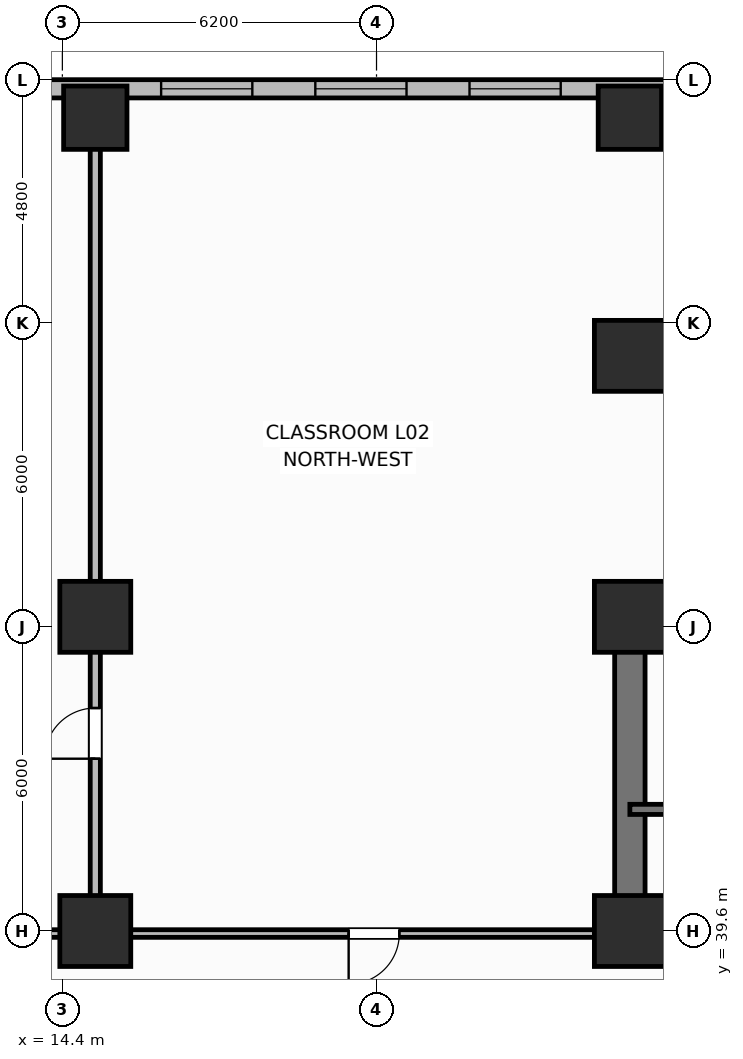
"""IFC4 building model, lengths in metres.
Left out: names, types, materials, properties, quantities, classifications, styles, units other than length and angle.
Written with IfcOpenShell. Run it as: python <this file> out.ifc"""

import sys

from ifc_helpers import new_model, si_unit, direction, frame, frame_2d, origin, origin_2d, place, context, subcontext, project, spatial, rectangle, extrude, element, fill, save


model = new_model("IFC4")
c1 = context("Model", 3, precision=1e-05, world=origin(), true_north=direction((0.0, 1.0)))
c2 = subcontext(c1, "Body", "Model", "MODEL_VIEW")
j1 = project(units=[si_unit("LENGTHUNIT", "METRE"), si_unit("PLANEANGLEUNIT", "RADIAN")], contexts=[c1])
p1 = place(None, origin())
s1 = spatial("IfcSite", under=j1, at=p1, CompositionType="ELEMENT")
p2 = place(p1, origin())
s2 = spatial("IfcBuilding", under=s1, at=p2, CompositionType="ELEMENT")
p3 = place(p2, frame((0.0, 0.0, 11.1)))
s3 = spatial("IfcBuildingStorey", under=s2, at=p3, CompositionType="ELEMENT", Elevation=11.1)
p4 = place(p3, frame((25.6, 45.8, 0.0), z_axis=(0.0, 0.0, 1.0), x_axis=(1.0, 0.0, 0.0)))
e1 = element("IfcWall", 1, at=p4, inside=s3, PredefinedType="SHEAR", context=c2, shape_type="SweptSolid", body=[
    extrude(rectangle(XDim=27.2, YDim=0.6, at=frame_2d((13.6, 0.0))), origin(), (0.0, 0.0, 1.0), 4.5),
])
p5 = place(p3, frame((25.6, 39.9, 0.0), z_axis=(0.0, 0.0, 1.0), x_axis=(0.0, 1.0, 0.0)))
e2 = element("IfcWall", 2, at=p5, inside=s3, PredefinedType="SHEAR", context=c2, shape_type="SweptSolid", body=[
    extrude(rectangle(XDim=5.6, YDim=0.6, at=frame_2d((2.8, 0.0))), origin(), (0.0, 0.0, 1.0), 4.5),
])
p6 = place(p3, frame((52.8, 39.6, 0.0), z_axis=(0.0, 0.0, 1.0), x_axis=(-1.0, 0.0, 0.0)))
e3 = element("IfcWall", 3, at=p6, inside=s3, PredefinedType="SHEAR", context=c2, shape_type="SweptSolid", body=[
    extrude(rectangle(XDim=27.2, YDim=0.6, at=frame_2d((13.6, 0.0))), origin(), (0.0, 0.0, 1.0), 4.5),
])
p7 = place(p6, frame((24.2, 0.0, 0.0)))
e4 = element("IfcOpeningElement", 4, at=p7, cuts=e3, PredefinedType="OPENING", context=c2, shape_type="SweptSolid", body=[
    extrude(rectangle(XDim=1.1, YDim=2.15, at=frame_2d((0.55, 1.075))), frame((0.0, 0.31, 0.0), z_axis=(0.0, -1.0, 0.0), x_axis=(1.0, 0.0, 0.0)), (0.0, 0.0, 1.0), 0.62),
])
p8 = place(p6, frame((15.1, 0.0, 0.0)))
e5 = element("IfcOpeningElement", 5, at=p8, cuts=e3, PredefinedType="OPENING", context=c2, shape_type="SweptSolid", body=[
    extrude(rectangle(XDim=1.2, YDim=2.15, at=frame_2d((0.6, 1.075))), frame((0.0, 0.31, 0.0), z_axis=(0.0, -1.0, 0.0), x_axis=(1.0, 0.0, 0.0)), (0.0, 0.0, 1.0), 0.62),
])
p9 = place(p6, frame((11.6, 0.0, 0.0)))
e6 = element("IfcOpeningElement", 6, at=p9, cuts=e3, PredefinedType="OPENING", context=c2, shape_type="SweptSolid", body=[
    extrude(rectangle(XDim=0.9, YDim=2.1, at=frame_2d((0.45, 1.05))), frame((0.0, 0.31, 0.0), z_axis=(0.0, -1.0, 0.0), x_axis=(1.0, 0.0, 0.0)), (0.0, 0.0, 1.0), 0.62),
])
p10 = place(p6, frame((3.6, 0.0, 0.0)))
e7 = element("IfcOpeningElement", 7, at=p10, cuts=e3, PredefinedType="OPENING", context=c2, shape_type="SweptSolid", body=[
    extrude(rectangle(XDim=1.0, YDim=2.15, at=frame_2d((0.5, 1.075))), frame((0.0, 0.31, 0.0), z_axis=(0.0, -1.0, 0.0), x_axis=(1.0, 0.0, 0.0)), (0.0, 0.0, 1.0), 0.62),
])
for number, where, z_axis, x_axis in (
    (8, (25.6, 39.6, 0.0), (0.0, 0.0, 1.0), (1.0, 0.0, 0.0)),
    (9, (25.6, 45.8, 0.0), (0.0, 0.0, 1.0), (1.0, 0.0, 0.0)),
):
    element("IfcColumn", number, at=place(p3, frame(where, z_axis=z_axis, x_axis=x_axis)), inside=s3, PredefinedType="COLUMN", context=c2, shape_type="SweptSolid", body=[
        extrude(rectangle(XDim=1.4, YDim=1.4, at=origin_2d()), origin(), (0.0, 0.0, 1.0), 4.5),
    ])
for number, where, z_axis, x_axis in (
    (10, (15.05, 55.65, 0.0), (0.0, 0.0, 1.0), (1.0, 0.0, 0.0)),
    (11, (25.6, 55.65, 0.0), (0.0, 0.0, 1.0), (1.0, 0.0, 0.0)),
):
    element("IfcColumn", number, at=place(p3, frame(where, z_axis=z_axis, x_axis=x_axis)), inside=s3, PredefinedType="COLUMN", context=c2, shape_type="SweptSolid", body=[
        extrude(rectangle(XDim=1.25, YDim=1.25, at=origin_2d()), origin(), (0.0, 0.0, 1.0), 4.5),
    ])
for number, where, z_axis, x_axis in (
    (12, (25.6, 50.95, 0.0), (0.0, 0.0, 1.0), (1.0, 0.0, 0.0)),
    (13, (15.05, 39.6, 0.0), (0.0, 0.0, 1.0), (1.0, 0.0, 0.0)),
    (14, (15.05, 45.8, 0.0), (0.0, 0.0, 1.0), (1.0, 0.0, 0.0)),
):
    element("IfcColumn", number, at=place(p3, frame(where, z_axis=z_axis, x_axis=x_axis)), inside=s3, PredefinedType="COLUMN", context=c2, shape_type="SweptSolid", body=[
        extrude(rectangle(XDim=1.4, YDim=1.4, at=origin_2d()), origin(), (0.0, 0.0, 1.0), 4.5),
    ])
p11 = place(p3, frame((56.57, 56.22, 0.0), z_axis=(0.0, 0.0, 1.0), x_axis=(-1.0, 0.0, 0.0)))
e15 = element("IfcWall", 15, at=p11, inside=s3, PredefinedType="SOLIDWALL", context=c2, shape_type="SweptSolid", body=[
    extrude(rectangle(XDim=55.59, YDim=0.36, at=frame_2d((27.795, 0.0))), origin(), (0.0, 0.0, 1.0), 3.48),
])
p12 = place(p11, frame((0.747, 0.0, 0.9)))
e16 = element("IfcOpeningElement", 16, at=p12, cuts=e15, PredefinedType="OPENING", context=c2, shape_type="SweptSolid", body=[
    extrude(rectangle(XDim=1.8, YDim=2.1, at=frame_2d((0.9, 1.05))), frame((0.0, 0.19, 0.0), z_axis=(0.0, -1.0, 0.0), x_axis=(1.0, 0.0, 0.0)), (0.0, 0.0, 1.0), 0.38),
])
p13 = place(p11, frame((5.19, 0.0, 0.9)))
e17 = element("IfcOpeningElement", 17, at=p13, cuts=e15, PredefinedType="OPENING", context=c2, shape_type="SweptSolid", body=[
    extrude(rectangle(XDim=1.8, YDim=2.1, at=frame_2d((0.9, 1.05))), frame((0.0, 0.19, 0.0), z_axis=(0.0, -1.0, 0.0), x_axis=(1.0, 0.0, 0.0)), (0.0, 0.0, 1.0), 0.38),
])
p14 = place(p11, frame((8.233, 0.0, 0.9)))
e18 = element("IfcOpeningElement", 18, at=p14, cuts=e15, PredefinedType="OPENING", context=c2, shape_type="SweptSolid", body=[
    extrude(rectangle(XDim=1.8, YDim=2.1, at=frame_2d((0.9, 1.05))), frame((0.0, 0.19, 0.0), z_axis=(0.0, -1.0, 0.0), x_axis=(1.0, 0.0, 0.0)), (0.0, 0.0, 1.0), 0.38),
])
p15 = place(p11, frame((11.626, 0.0, 0.9)))
e19 = element("IfcOpeningElement", 19, at=p15, cuts=e15, PredefinedType="OPENING", context=c2, shape_type="SweptSolid", body=[
    extrude(rectangle(XDim=1.8, YDim=2.1, at=frame_2d((0.9, 1.05))), frame((0.0, 0.19, 0.0), z_axis=(0.0, -1.0, 0.0), x_axis=(1.0, 0.0, 0.0)), (0.0, 0.0, 1.0), 0.38),
])
p16 = place(p11, frame((14.319, 0.0, 0.9)))
e20 = element("IfcOpeningElement", 20, at=p16, cuts=e15, PredefinedType="OPENING", context=c2, shape_type="SweptSolid", body=[
    extrude(rectangle(XDim=1.8, YDim=2.1, at=frame_2d((0.9, 1.05))), frame((0.0, 0.19, 0.0), z_axis=(0.0, -1.0, 0.0), x_axis=(1.0, 0.0, 0.0)), (0.0, 0.0, 1.0), 0.38),
])
p17 = place(p11, frame((18.762, 0.0, 0.9)))
e21 = element("IfcOpeningElement", 21, at=p17, cuts=e15, PredefinedType="OPENING", context=c2, shape_type="SweptSolid", body=[
    extrude(rectangle(XDim=1.8, YDim=2.1, at=frame_2d((0.9, 1.05))), frame((0.0, 0.19, 0.0), z_axis=(0.0, -1.0, 0.0), x_axis=(1.0, 0.0, 0.0)), (0.0, 0.0, 1.0), 0.38),
])
p18 = place(p11, frame((21.805, 0.0, 0.9)))
e22 = element("IfcOpeningElement", 22, at=p18, cuts=e15, PredefinedType="OPENING", context=c2, shape_type="SweptSolid", body=[
    extrude(rectangle(XDim=1.8, YDim=2.1, at=frame_2d((0.9, 1.05))), frame((0.0, 0.19, 0.0), z_axis=(0.0, -1.0, 0.0), x_axis=(1.0, 0.0, 0.0)), (0.0, 0.0, 1.0), 0.38),
])
p19 = place(p11, frame((25.198, 0.0, 0.9)))
e23 = element("IfcOpeningElement", 23, at=p19, cuts=e15, PredefinedType="OPENING", context=c2, shape_type="SweptSolid", body=[
    extrude(rectangle(XDim=1.8, YDim=2.1, at=frame_2d((0.9, 1.05))), frame((0.0, 0.19, 0.0), z_axis=(0.0, -1.0, 0.0), x_axis=(1.0, 0.0, 0.0)), (0.0, 0.0, 1.0), 0.38),
])
p20 = place(p11, frame((27.892, 0.0, 0.9)))
e24 = element("IfcOpeningElement", 24, at=p20, cuts=e15, PredefinedType="OPENING", context=c2, shape_type="SweptSolid", body=[
    extrude(rectangle(XDim=1.8, YDim=2.1, at=frame_2d((0.9, 1.05))), frame((0.0, 0.19, 0.0), z_axis=(0.0, -1.0, 0.0), x_axis=(1.0, 0.0, 0.0)), (0.0, 0.0, 1.0), 0.38),
])
p21 = place(p11, frame((32.335, 0.0, 0.9)))
e25 = element("IfcOpeningElement", 25, at=p21, cuts=e15, PredefinedType="OPENING", context=c2, shape_type="SweptSolid", body=[
    extrude(rectangle(XDim=1.8, YDim=2.1, at=frame_2d((0.9, 1.05))), frame((0.0, 0.19, 0.0), z_axis=(0.0, -1.0, 0.0), x_axis=(1.0, 0.0, 0.0)), (0.0, 0.0, 1.0), 0.38),
])
p22 = place(p11, frame((35.378, 0.0, 0.9)))
e26 = element("IfcOpeningElement", 26, at=p22, cuts=e15, PredefinedType="OPENING", context=c2, shape_type="SweptSolid", body=[
    extrude(rectangle(XDim=1.8, YDim=2.1, at=frame_2d((0.9, 1.05))), frame((0.0, 0.19, 0.0), z_axis=(0.0, -1.0, 0.0), x_axis=(1.0, 0.0, 0.0)), (0.0, 0.0, 1.0), 0.38),
])
p23 = place(p11, frame((38.421, 0.0, 0.9)))
e27 = element("IfcOpeningElement", 27, at=p23, cuts=e15, PredefinedType="OPENING", context=c2, shape_type="SweptSolid", body=[
    extrude(rectangle(XDim=1.8, YDim=2.1, at=frame_2d((0.9, 1.05))), frame((0.0, 0.19, 0.0), z_axis=(0.0, -1.0, 0.0), x_axis=(1.0, 0.0, 0.0)), (0.0, 0.0, 1.0), 0.38),
])
p24 = place(p11, frame((42.864, 0.0, 0.9)))
e28 = element("IfcOpeningElement", 28, at=p24, cuts=e15, PredefinedType="OPENING", context=c2, shape_type="SweptSolid", body=[
    extrude(rectangle(XDim=1.8, YDim=2.1, at=frame_2d((0.9, 1.05))), frame((0.0, 0.19, 0.0), z_axis=(0.0, -1.0, 0.0), x_axis=(1.0, 0.0, 0.0)), (0.0, 0.0, 1.0), 0.38),
])
p25 = place(p11, frame((45.557, 0.0, 0.9)))
e29 = element("IfcOpeningElement", 29, at=p25, cuts=e15, PredefinedType="OPENING", context=c2, shape_type="SweptSolid", body=[
    extrude(rectangle(XDim=1.8, YDim=2.1, at=frame_2d((0.9, 1.05))), frame((0.0, 0.19, 0.0), z_axis=(0.0, -1.0, 0.0), x_axis=(1.0, 0.0, 0.0)), (0.0, 0.0, 1.0), 0.38),
])
p26 = place(p11, frame((52.344, 0.0, 0.9)))
e30 = element("IfcOpeningElement", 30, at=p26, cuts=e15, PredefinedType="OPENING", context=c2, shape_type="SweptSolid", body=[
    extrude(rectangle(XDim=1.8, YDim=2.1, at=frame_2d((0.9, 1.05))), frame((0.0, 0.19, 0.0), z_axis=(0.0, -1.0, 0.0), x_axis=(1.0, 0.0, 0.0)), (0.0, 0.0, 1.0), 0.38),
])
p27 = place(p3, frame((35.15, 42.0, 0.0), z_axis=(0.0, 0.0, 1.0), x_axis=(-1.0, 0.0, 0.0)))
e31 = element("IfcWall", 31, at=p27, inside=s3, PredefinedType="SHEAR", context=c2, shape_type="SweptSolid", body=[
    extrude(rectangle(XDim=9.55, YDim=0.2, at=frame_2d((4.775, 0.0))), origin(), (0.0, 0.0, 1.0), 4.5),
])
p28 = place(p27, frame((7.25, 0.0, 0.0)))
e32 = element("IfcOpeningElement", 32, at=p28, cuts=e31, PredefinedType="OPENING", context=c2, shape_type="SweptSolid", body=[
    extrude(rectangle(XDim=1.1, YDim=2.15, at=frame_2d((0.55, 1.075))), frame((0.0, 0.11, 0.0), z_axis=(0.0, -1.0, 0.0), x_axis=(1.0, 0.0, 0.0)), (0.0, 0.0, 1.0), 0.22),
])
p29 = place(p3, frame((15.05, 39.6, 0.0), z_axis=(0.0, 0.0, 1.0), x_axis=(0.0, 1.0, 0.0)))
e33 = element("IfcWall", 33, at=p29, inside=s3, PredefinedType="PARTITIONING", context=c2, shape_type="SweptSolid", body=[
    extrude(rectangle(XDim=16.4, YDim=0.2, at=frame_2d((8.2, 0.0))), origin(), (0.0, 0.0, 1.0), 3.42),
])
p30 = place(p29, frame((3.4, 0.0, 0.0)))
e34 = element("IfcOpeningElement", 34, at=p30, cuts=e33, PredefinedType="OPENING", context=c2, shape_type="SweptSolid", body=[
    extrude(rectangle(XDim=1.0, YDim=2.15, at=frame_2d((0.5, 1.075))), frame((0.0, 0.11, 0.0), z_axis=(0.0, -1.0, 0.0), x_axis=(1.0, 0.0, 0.0)), (0.0, 0.0, 1.0), 0.22),
])
p31 = place(p3, frame((25.25, 39.55, 0.0), z_axis=(0.0, 0.0, 1.0), x_axis=(-1.0, 0.0, 0.0)))
e35 = element("IfcWall", 35, at=p31, inside=s3, PredefinedType="PARTITIONING", context=c2, shape_type="SweptSolid", body=[
    extrude(rectangle(XDim=13.25, YDim=0.15, at=frame_2d((6.625, 0.0))), origin(), (0.0, 0.0, 1.0), 3.42),
])
p32 = place(p31, frame((4.2, 0.0, 0.0)))
e36 = element("IfcOpeningElement", 36, at=p32, cuts=e35, PredefinedType="OPENING", context=c2, shape_type="SweptSolid", body=[
    extrude(rectangle(XDim=1.0, YDim=2.15, at=frame_2d((0.5, 1.075))), frame((0.0, 0.085, 0.0), z_axis=(0.0, -1.0, 0.0), x_axis=(1.0, 0.0, 0.0)), (0.0, 0.0, 1.0), 0.17),
])
p33 = place(p21, origin())
e37 = element("IfcWindow", 37, at=p33, inside=s3, PartitioningType="SINGLE_PANEL", PredefinedType="WINDOW", context=c2, shape_type="SweptSolid", body=[
    extrude(rectangle(XDim=1.8, YDim=2.1, at=frame_2d((0.9, 1.05))), frame((0.0, 0.03, 0.0), z_axis=(0.0, -1.0, 0.0), x_axis=(1.0, 0.0, 0.0)), (0.0, 0.0, 1.0), 0.06),
])
fill(e25, e37)
p34 = place(p22, origin())
e38 = element("IfcWindow", 38, at=p34, inside=s3, PartitioningType="SINGLE_PANEL", PredefinedType="WINDOW", context=c2, shape_type="SweptSolid", body=[
    extrude(rectangle(XDim=1.8, YDim=2.1, at=frame_2d((0.9, 1.05))), frame((0.0, 0.03, 0.0), z_axis=(0.0, -1.0, 0.0), x_axis=(1.0, 0.0, 0.0)), (0.0, 0.0, 1.0), 0.06),
])
fill(e26, e38)
p35 = place(p23, origin())
e39 = element("IfcWindow", 39, at=p35, inside=s3, PartitioningType="SINGLE_PANEL", PredefinedType="WINDOW", context=c2, shape_type="SweptSolid", body=[
    extrude(rectangle(XDim=1.8, YDim=2.1, at=frame_2d((0.9, 1.05))), frame((0.0, 0.03, 0.0), z_axis=(0.0, -1.0, 0.0), x_axis=(1.0, 0.0, 0.0)), (0.0, 0.0, 1.0), 0.06),
])
fill(e27, e39)
p36 = place(p30, origin())
e40 = element("IfcDoor", 40, at=p36, inside=s3, OperationType="SINGLE_SWING_LEFT", PredefinedType="DOOR", context=c2, shape_type="SweptSolid", body=[
    extrude(rectangle(XDim=1.0, YDim=2.15, at=frame_2d((0.5, 1.075))), frame((0.0, 0.025, 0.0), z_axis=(0.0, -1.0, 0.0), x_axis=(1.0, 0.0, 0.0)), (0.0, 0.0, 1.0), 0.05),
])
fill(e34, e40)
p37 = place(p32, origin())
e41 = element("IfcDoor", 41, at=p37, inside=s3, OperationType="SINGLE_SWING_RIGHT", PredefinedType="DOOR", context=c2, shape_type="SweptSolid", body=[
    extrude(rectangle(XDim=1.0, YDim=2.15, at=frame_2d((0.5, 1.075))), frame((0.0, 0.025, 0.0), z_axis=(0.0, -1.0, 0.0), x_axis=(1.0, 0.0, 0.0)), (0.0, 0.0, 1.0), 0.05),
])
fill(e36, e41)
save(model, sys.argv[1])
